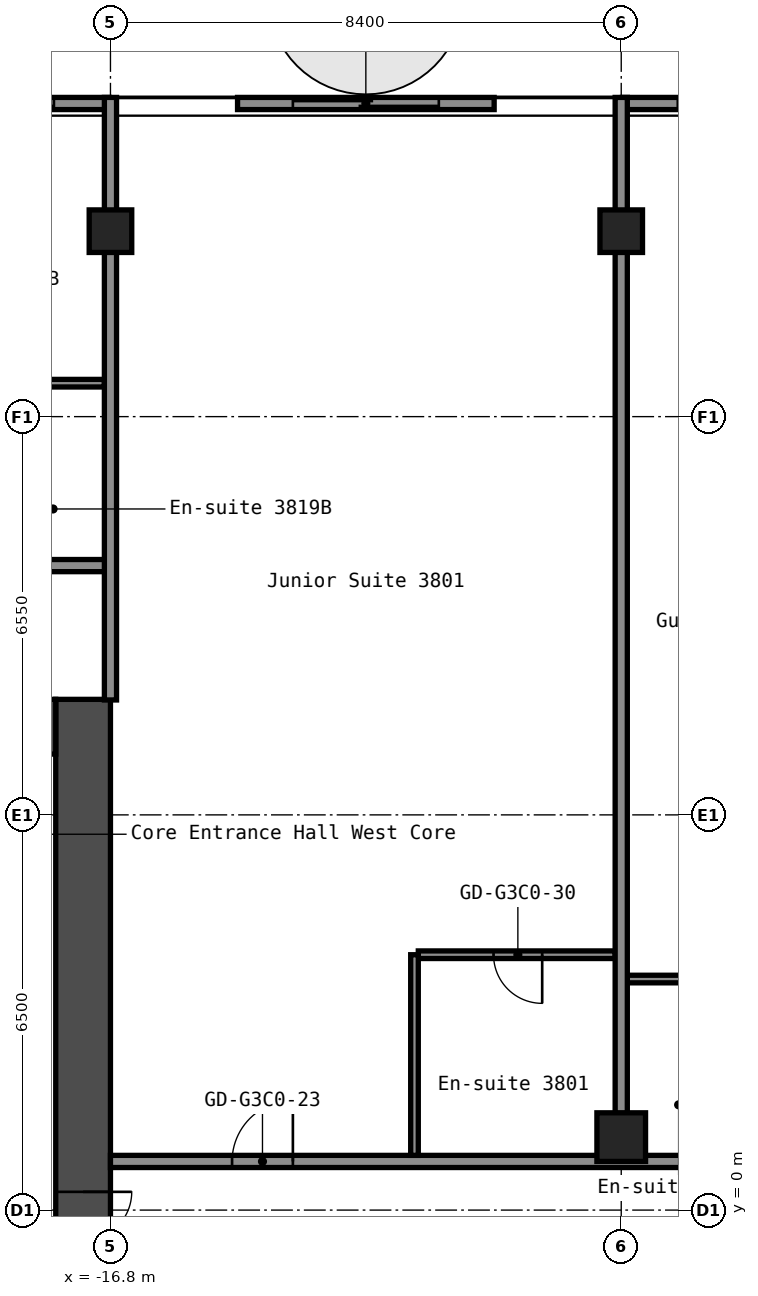
"""IFC4 building model, lengths in metres.
Left out: names, types, materials, properties, quantities, classifications, styles, units other than length and angle.
Written with IfcOpenShell. Run it as: python <this file> out.ifc"""

import sys

from ifc_helpers import new_model, si_unit, direction, frame, frame_2d, origin, origin_2d, place, context, subcontext, project, spatial, rectangle, hollow_rectangle, extrude, element, fill, save


model = new_model("IFC4")
c1 = context("Model", 3, precision=1e-05, world=origin(), true_north=direction((0.0, 1.0)))
c2 = subcontext(c1, "Body", "Model", "MODEL_VIEW")
j1 = project(units=[si_unit("LENGTHUNIT", "METRE"), si_unit("PLANEANGLEUNIT", "RADIAN")], contexts=[c1])
p1 = place(None, origin())
s1 = spatial("IfcSite", under=j1, at=p1, CompositionType="ELEMENT")
p2 = place(p1, origin())
s2 = spatial("IfcBuilding", under=s1, at=p2, CompositionType="ELEMENT")
p3 = place(p2, frame((0.0, 0.0, 137.4)))
s3 = spatial("IfcBuildingStorey", under=s2, at=p3, CompositionType="ELEMENT", Elevation=137.4)
p4 = place(p3, frame((-16.8, 16.1, 0.0), z_axis=(0.0, 0.0, 1.0), x_axis=(1.0, 0.0, 0.0)))
e1 = element("IfcColumn", 1, at=p4, inside=s3, PredefinedType="COLUMN", context=c2, shape_type="SweptSolid", body=[
    extrude(hollow_rectangle(XDim=0.7, YDim=0.7, WallThickness=0.028, at=origin_2d()), origin(), (0.0, 0.0, 1.0), 2.75),
])
p5 = place(p3, frame((-8.4, 1.2, 0.0), z_axis=(0.0, 0.0, 1.0), x_axis=(1.0, 0.0, 0.0)))
e2 = element("IfcColumn", 2, at=p5, inside=s3, PredefinedType="COLUMN", context=c2, shape_type="SweptSolid", body=[
    extrude(hollow_rectangle(XDim=0.8, YDim=0.8, WallThickness=0.032, at=origin_2d()), origin(), (0.0, 0.0, 1.0), 2.75),
])
p6 = place(p3, frame((-8.4, 16.1, 0.0), z_axis=(0.0, 0.0, 1.0), x_axis=(1.0, 0.0, 0.0)))
e3 = element("IfcColumn", 3, at=p6, inside=s3, PredefinedType="COLUMN", context=c2, shape_type="SweptSolid", body=[
    extrude(hollow_rectangle(XDim=0.7, YDim=0.7, WallThickness=0.028, at=origin_2d()), origin(), (0.0, 0.0, 1.0), 2.75),
])
p7 = place(p3, frame((-17.25, -8.4, 0.0), z_axis=(0.0, 0.0, 1.0), x_axis=(0.0, 1.0, 0.0)))
e4 = element("IfcWall", 4, at=p7, inside=s3, PredefinedType="SHEAR", context=c2, shape_type="SweptSolid", body=[
    extrude(rectangle(XDim=16.8, YDim=0.9, at=frame_2d((8.4, 0.0))), origin(), (0.0, 0.0, 1.0), 2.75),
])
p8 = place(p7, frame((7.1, 0.0, 0.0)))
e5 = element("IfcOpeningElement", 5, at=p8, cuts=e4, PredefinedType="OPENING", context=c2, shape_type="SweptSolid", body=[
    extrude(rectangle(XDim=1.6, YDim=2.1, at=frame_2d((0.8, 1.05))), frame((0.0, 0.46, 0.0), z_axis=(0.0, -1.0, 0.0), x_axis=(1.0, 0.0, 0.0)), (0.0, 0.0, 1.0), 0.92),
])
p9 = place(p3, frame((-32.7, 7.95, 0.0), z_axis=(0.0, 0.0, 1.0), x_axis=(1.0, 0.0, 0.0)))
e6 = element("IfcWall", 6, at=p9, inside=s3, PredefinedType="SHEAR", context=c2, shape_type="SweptSolid", body=[
    extrude(rectangle(XDim=15.0, YDim=0.9, at=frame_2d((7.5, 0.0))), origin(), (0.0, 0.0, 1.0), 2.75),
])
p10 = place(p9, frame((3.4, 0.0, 0.0)))
e7 = element("IfcOpeningElement", 7, at=p10, cuts=e6, PredefinedType="OPENING", context=c2, shape_type="SweptSolid", body=[
    extrude(rectangle(XDim=1.2, YDim=2.1, at=frame_2d((0.6, 1.05))), frame((0.0, 0.46, 0.0), z_axis=(0.0, -1.0, 0.0), x_axis=(1.0, 0.0, 0.0)), (0.0, 0.0, 1.0), 0.92),
])
p11 = place(p9, frame((0.75, 0.0, 0.0)))
e8 = element("IfcOpeningElement", 8, at=p11, cuts=e6, PredefinedType="OPENING", context=c2, shape_type="SweptSolid", body=[
    extrude(rectangle(XDim=0.9, YDim=2.1, at=frame_2d((0.45, 1.05))), frame((0.0, 0.46, 0.0), z_axis=(0.0, -1.0, 0.0), x_axis=(1.0, 0.0, 0.0)), (0.0, 0.0, 1.0), 0.92),
])
p12 = place(p3, frame((-16.8, 0.8, 0.0), z_axis=(0.0, 0.0, 1.0), x_axis=(1.0, 0.0, 0.0)))
e9 = element("IfcWall", 9, at=p12, inside=s3, PredefinedType="PARTITIONING", context=c2, shape_type="SweptSolid", body=[
    extrude(rectangle(XDim=33.6, YDim=0.2, at=frame_2d((16.8, 0.0))), origin(), (0.0, 0.0, 1.0), 2.75),
])
p13 = place(p12, frame((2.0, 0.0, 0.0)))
e10 = element("IfcOpeningElement", 10, at=p13, cuts=e9, PredefinedType="OPENING", context=c2, shape_type="SweptSolid", body=[
    extrude(rectangle(XDim=1.0, YDim=2.1, at=frame_2d((0.5, 1.05))), frame((0.0, 0.11, 0.0), z_axis=(0.0, -1.0, 0.0), x_axis=(1.0, 0.0, 0.0)), (0.0, 0.0, 1.0), 0.22),
])
p14 = place(p12, frame((11.25, 0.0, 0.0)))
e11 = element("IfcOpeningElement", 11, at=p14, cuts=e9, PredefinedType="OPENING", context=c2, shape_type="SweptSolid", body=[
    extrude(rectangle(XDim=1.0, YDim=2.1, at=frame_2d((0.5, 1.05))), frame((0.0, 0.11, 0.0), z_axis=(0.0, -1.0, 0.0), x_axis=(1.0, 0.0, 0.0)), (0.0, 0.0, 1.0), 0.22),
])
p15 = place(p12, frame((12.95, 0.0, 0.0)))
e12 = element("IfcOpeningElement", 12, at=p15, cuts=e9, PredefinedType="OPENING", context=c2, shape_type="SweptSolid", body=[
    extrude(rectangle(XDim=1.0, YDim=2.1, at=frame_2d((0.5, 1.05))), frame((0.0, 0.11, 0.0), z_axis=(0.0, -1.0, 0.0), x_axis=(1.0, 0.0, 0.0)), (0.0, 0.0, 1.0), 0.22),
])
p16 = place(p12, frame((18.7, 0.0, 0.0)))
e13 = element("IfcOpeningElement", 13, at=p16, cuts=e9, PredefinedType="OPENING", context=c2, shape_type="SweptSolid", body=[
    extrude(rectangle(XDim=0.9, YDim=2.1, at=frame_2d((0.45, 1.05))), frame((0.0, 0.11, 0.0), z_axis=(0.0, -1.0, 0.0), x_axis=(1.0, 0.0, 0.0)), (0.0, 0.0, 1.0), 0.22),
])
p17 = place(p12, frame((22.9, 0.0, 0.0)))
e14 = element("IfcOpeningElement", 14, at=p17, cuts=e9, PredefinedType="OPENING", context=c2, shape_type="SweptSolid", body=[
    extrude(rectangle(XDim=0.9, YDim=2.1, at=frame_2d((0.45, 1.05))), frame((0.0, 0.11, 0.0), z_axis=(0.0, -1.0, 0.0), x_axis=(1.0, 0.0, 0.0)), (0.0, 0.0, 1.0), 0.22),
])
p18 = place(p12, frame((28.05, 0.0, 0.0)))
e15 = element("IfcOpeningElement", 15, at=p18, cuts=e9, PredefinedType="OPENING", context=c2, shape_type="SweptSolid", body=[
    extrude(rectangle(XDim=1.0, YDim=2.1, at=frame_2d((0.5, 1.05))), frame((0.0, 0.11, 0.0), z_axis=(0.0, -1.0, 0.0), x_axis=(1.0, 0.0, 0.0)), (0.0, 0.0, 1.0), 0.22),
])
p19 = place(p12, frame((29.75, 0.0, 0.0)))
e16 = element("IfcOpeningElement", 16, at=p19, cuts=e9, PredefinedType="OPENING", context=c2, shape_type="SweptSolid", body=[
    extrude(rectangle(XDim=1.0, YDim=2.1, at=frame_2d((0.5, 1.05))), frame((0.0, 0.11, 0.0), z_axis=(0.0, -1.0, 0.0), x_axis=(1.0, 0.0, 0.0)), (0.0, 0.0, 1.0), 0.22),
])
p20 = place(p3, frame((-8.3, 3.8, 0.0), z_axis=(0.0, 0.0, 1.0), x_axis=(1.0, 0.0, 0.0)))
e17 = element("IfcWall", 17, at=p20, inside=s3, PredefinedType="PARTITIONING", context=c2, shape_type="SweptSolid", body=[
    extrude(rectangle(XDim=2.338, YDim=0.125, at=frame_2d((1.169, 0.0))), origin(), (0.0, 0.0, 1.0), 2.75),
])
p21 = place(p3, frame((-11.738, 4.2, 0.0), z_axis=(0.0, 0.0, 1.0), x_axis=(1.0, 0.0, 0.0)))
e18 = element("IfcWall", 18, at=p21, inside=s3, PredefinedType="PARTITIONING", context=c2, shape_type="SweptSolid", body=[
    extrude(rectangle(XDim=3.238, YDim=0.125, at=frame_2d((1.619, 0.0))), origin(), (0.0, 0.0, 1.0), 2.75),
])
p22 = place(p21, frame((1.238, 0.0, 0.0)))
e19 = element("IfcOpeningElement", 19, at=p22, cuts=e18, PredefinedType="OPENING", context=c2, shape_type="SweptSolid", body=[
    extrude(rectangle(XDim=0.8, YDim=2.1, at=frame_2d((0.4, 1.05))), frame((0.0, 0.073, 0.0), z_axis=(0.0, -1.0, 0.0), x_axis=(1.0, 0.0, 0.0)), (0.0, 0.0, 1.0), 0.145),
])
p23 = place(p3, frame((-42.7, 10.6, 0.0), z_axis=(0.0, 0.0, 1.0), x_axis=(1.0, 0.0, 0.0)))
e20 = element("IfcWall", 20, at=p23, inside=s3, PredefinedType="PARTITIONING", context=c2, shape_type="SweptSolid", body=[
    extrude(rectangle(XDim=25.9, YDim=0.2, at=frame_2d((12.95, 0.0))), origin(), (0.0, 0.0, 1.0), 2.75),
])
p24 = place(p23, frame((3.25, 0.0, 0.0)))
e21 = element("IfcOpeningElement", 21, at=p24, cuts=e20, PredefinedType="OPENING", context=c2, shape_type="SweptSolid", body=[
    extrude(rectangle(XDim=1.0, YDim=2.1, at=frame_2d((0.5, 1.05))), frame((0.0, 0.11, 0.0), z_axis=(0.0, -1.0, 0.0), x_axis=(1.0, 0.0, 0.0)), (0.0, 0.0, 1.0), 0.22),
])
p25 = place(p23, frame((5.15, 0.0, 0.0)))
e22 = element("IfcOpeningElement", 22, at=p25, cuts=e20, PredefinedType="OPENING", context=c2, shape_type="SweptSolid", body=[
    extrude(rectangle(XDim=1.0, YDim=2.1, at=frame_2d((0.5, 1.05))), frame((0.0, 0.11, 0.0), z_axis=(0.0, -1.0, 0.0), x_axis=(1.0, 0.0, 0.0)), (0.0, 0.0, 1.0), 0.22),
])
p26 = place(p23, frame((11.1, 0.0, 0.0)))
e23 = element("IfcOpeningElement", 23, at=p26, cuts=e20, PredefinedType="OPENING", context=c2, shape_type="SweptSolid", body=[
    extrude(rectangle(XDim=1.0, YDim=2.1, at=frame_2d((0.5, 1.05))), frame((0.0, 0.11, 0.0), z_axis=(0.0, -1.0, 0.0), x_axis=(1.0, 0.0, 0.0)), (0.0, 0.0, 1.0), 0.22),
])
p27 = place(p23, frame((20.35, 0.0, 0.0)))
e24 = element("IfcOpeningElement", 24, at=p27, cuts=e20, PredefinedType="OPENING", context=c2, shape_type="SweptSolid", body=[
    extrude(rectangle(XDim=1.0, YDim=2.1, at=frame_2d((0.5, 1.05))), frame((0.0, 0.11, 0.0), z_axis=(0.0, -1.0, 0.0), x_axis=(1.0, 0.0, 0.0)), (0.0, 0.0, 1.0), 0.22),
])
p28 = place(p23, frame((22.05, 0.0, 0.0)))
e25 = element("IfcOpeningElement", 25, at=p28, cuts=e20, PredefinedType="OPENING", context=c2, shape_type="SweptSolid", body=[
    extrude(rectangle(XDim=1.0, YDim=2.1, at=frame_2d((0.5, 1.05))), frame((0.0, 0.11, 0.0), z_axis=(0.0, -1.0, 0.0), x_axis=(1.0, 0.0, 0.0)), (0.0, 0.0, 1.0), 0.22),
])
p29 = place(p3, frame((-19.238, 13.6, 0.0), z_axis=(0.0, 0.0, 1.0), x_axis=(1.0, 0.0, 0.0)))
e26 = element("IfcWall", 26, at=p29, inside=s3, PredefinedType="PARTITIONING", context=c2, shape_type="SweptSolid", body=[
    extrude(rectangle(XDim=2.338, YDim=0.125, at=frame_2d((1.169, 0.0))), origin(), (0.0, 0.0, 1.0), 2.75),
])
p30 = place(p3, frame((-16.8, 8.39, 0.0), z_axis=(0.0, 0.0, 1.0), x_axis=(0.0, 1.0, 0.0)))
e27 = element("IfcWall", 27, at=p30, inside=s3, PredefinedType="PARTITIONING", context=c2, shape_type="SweptSolid", body=[
    extrude(rectangle(XDim=9.91, YDim=0.2, at=frame_2d((4.955, 0.0))), origin(), (0.0, 0.0, 1.0), 2.75),
])
p31 = place(p3, frame((-11.8, 0.9, 0.0), z_axis=(0.0, 0.0, 1.0), x_axis=(0.0, 1.0, 0.0)))
e28 = element("IfcWall", 28, at=p31, inside=s3, PredefinedType="PARTITIONING", context=c2, shape_type="SweptSolid", body=[
    extrude(rectangle(XDim=3.3, YDim=0.125, at=frame_2d((1.65, 0.0))), origin(), (0.0, 0.0, 1.0), 2.75),
])
p32 = place(p3, frame((-8.4, 1.59, 0.0), z_axis=(0.0, 0.0, 1.0), x_axis=(0.0, 1.0, 0.0)))
e29 = element("IfcWall", 29, at=p32, inside=s3, PredefinedType="PARTITIONING", context=c2, shape_type="SweptSolid", body=[
    extrude(rectangle(XDim=16.71, YDim=0.2, at=frame_2d((8.355, 0.0))), origin(), (0.0, 0.0, 1.0), 2.75),
])
p33 = place(p3, frame((-4.16, 18.2, 0.0), z_axis=(0.0, 0.0, 1.0), x_axis=(-1.0, 0.0, 0.0)))
p34 = place(p33, frame((0.91, 0.0, 0.0)))
p35 = place(p34, frame((2.4, 0.0, 0.0), z_axis=(0.0, 0.0, 1.0), x_axis=(-1.0, 0.0, 0.0)))
e30 = element("IfcDoor", 30, at=p35, inside=s3, OperationType="SLIDING_TO_LEFT", PredefinedType="DOOR", context=c2, shape_type="SweptSolid", body=[
    extrude(rectangle(XDim=2.4, YDim=2.2, at=frame_2d((1.2, 1.1))), frame((0.0, 0.025, 0.0), z_axis=(0.0, -1.0, 0.0), x_axis=(1.0, 0.0, 0.0)), (0.0, 0.0, 1.0), 0.05),
])
p36 = place(p3, frame((-10.49, 18.2, 0.0), z_axis=(0.0, 0.0, 1.0), x_axis=(-1.0, 0.0, 0.0)))
p37 = place(p36, frame((0.91, 0.0, 0.0)))
p38 = place(p37, frame((2.4, 0.0, 0.0), z_axis=(0.0, 0.0, 1.0), x_axis=(-1.0, 0.0, 0.0)))
e31 = element("IfcDoor", 31, at=p38, inside=s3, OperationType="SLIDING_TO_LEFT", PredefinedType="DOOR", context=c2, shape_type="SweptSolid", body=[
    extrude(rectangle(XDim=2.4, YDim=2.2, at=frame_2d((1.2, 1.1))), frame((0.0, 0.025, 0.0), z_axis=(0.0, -1.0, 0.0), x_axis=(1.0, 0.0, 0.0)), (0.0, 0.0, 1.0), 0.05),
])
p39 = place(p3, frame((-16.82, 18.2, 0.0), z_axis=(0.0, 0.0, 1.0), x_axis=(-1.0, 0.0, 0.0)))
p40 = place(p39, frame((0.91, 0.0, 0.0)))
p41 = place(p40, frame((2.4, 0.0, 0.0), z_axis=(0.0, 0.0, 1.0), x_axis=(-1.0, 0.0, 0.0)))
e32 = element("IfcDoor", 32, at=p41, inside=s3, OperationType="SLIDING_TO_LEFT", PredefinedType="DOOR", context=c2, shape_type="SweptSolid", body=[
    extrude(rectangle(XDim=2.4, YDim=2.2, at=frame_2d((1.2, 1.1))), frame((0.0, 0.025, 0.0), z_axis=(0.0, -1.0, 0.0), x_axis=(1.0, 0.0, 0.0)), (0.0, 0.0, 1.0), 0.05),
])
p42 = place(p8, origin())
e33 = element("IfcDoor", 33, at=p42, inside=s3, OperationType="DOUBLE_DOOR_SINGLE_SWING", PredefinedType="DOOR", context=c2, shape_type="SweptSolid", body=[
    extrude(rectangle(XDim=1.6, YDim=2.1, at=frame_2d((0.8, 1.05))), frame((0.0, 0.025, 0.0), z_axis=(0.0, -1.0, 0.0), x_axis=(1.0, 0.0, 0.0)), (0.0, 0.0, 1.0), 0.05),
])
fill(e5, e33)
p43 = place(p13, origin())
e34 = element("IfcDoor", 34, at=p43, inside=s3, OperationType="SINGLE_SWING_LEFT", PredefinedType="DOOR", context=c2, shape_type="SweptSolid", body=[
    extrude(rectangle(XDim=1.0, YDim=2.1, at=frame_2d((0.5, 1.05))), frame((0.0, 0.025, 0.0), z_axis=(0.0, -1.0, 0.0), x_axis=(1.0, 0.0, 0.0)), (0.0, 0.0, 1.0), 0.05),
])
fill(e10, e34)
p44 = place(p22, origin())
e35 = element("IfcDoor", 35, at=p44, inside=s3, OperationType="SINGLE_SWING_RIGHT", PredefinedType="DOOR", context=c2, shape_type="SweptSolid", body=[
    extrude(rectangle(XDim=0.8, YDim=2.1, at=frame_2d((0.4, 1.05))), frame((0.0, 0.025, 0.0), z_axis=(0.0, -1.0, 0.0), x_axis=(1.0, 0.0, 0.0)), (0.0, 0.0, 1.0), 0.05),
])
fill(e19, e35)
save(model, sys.argv[1])
